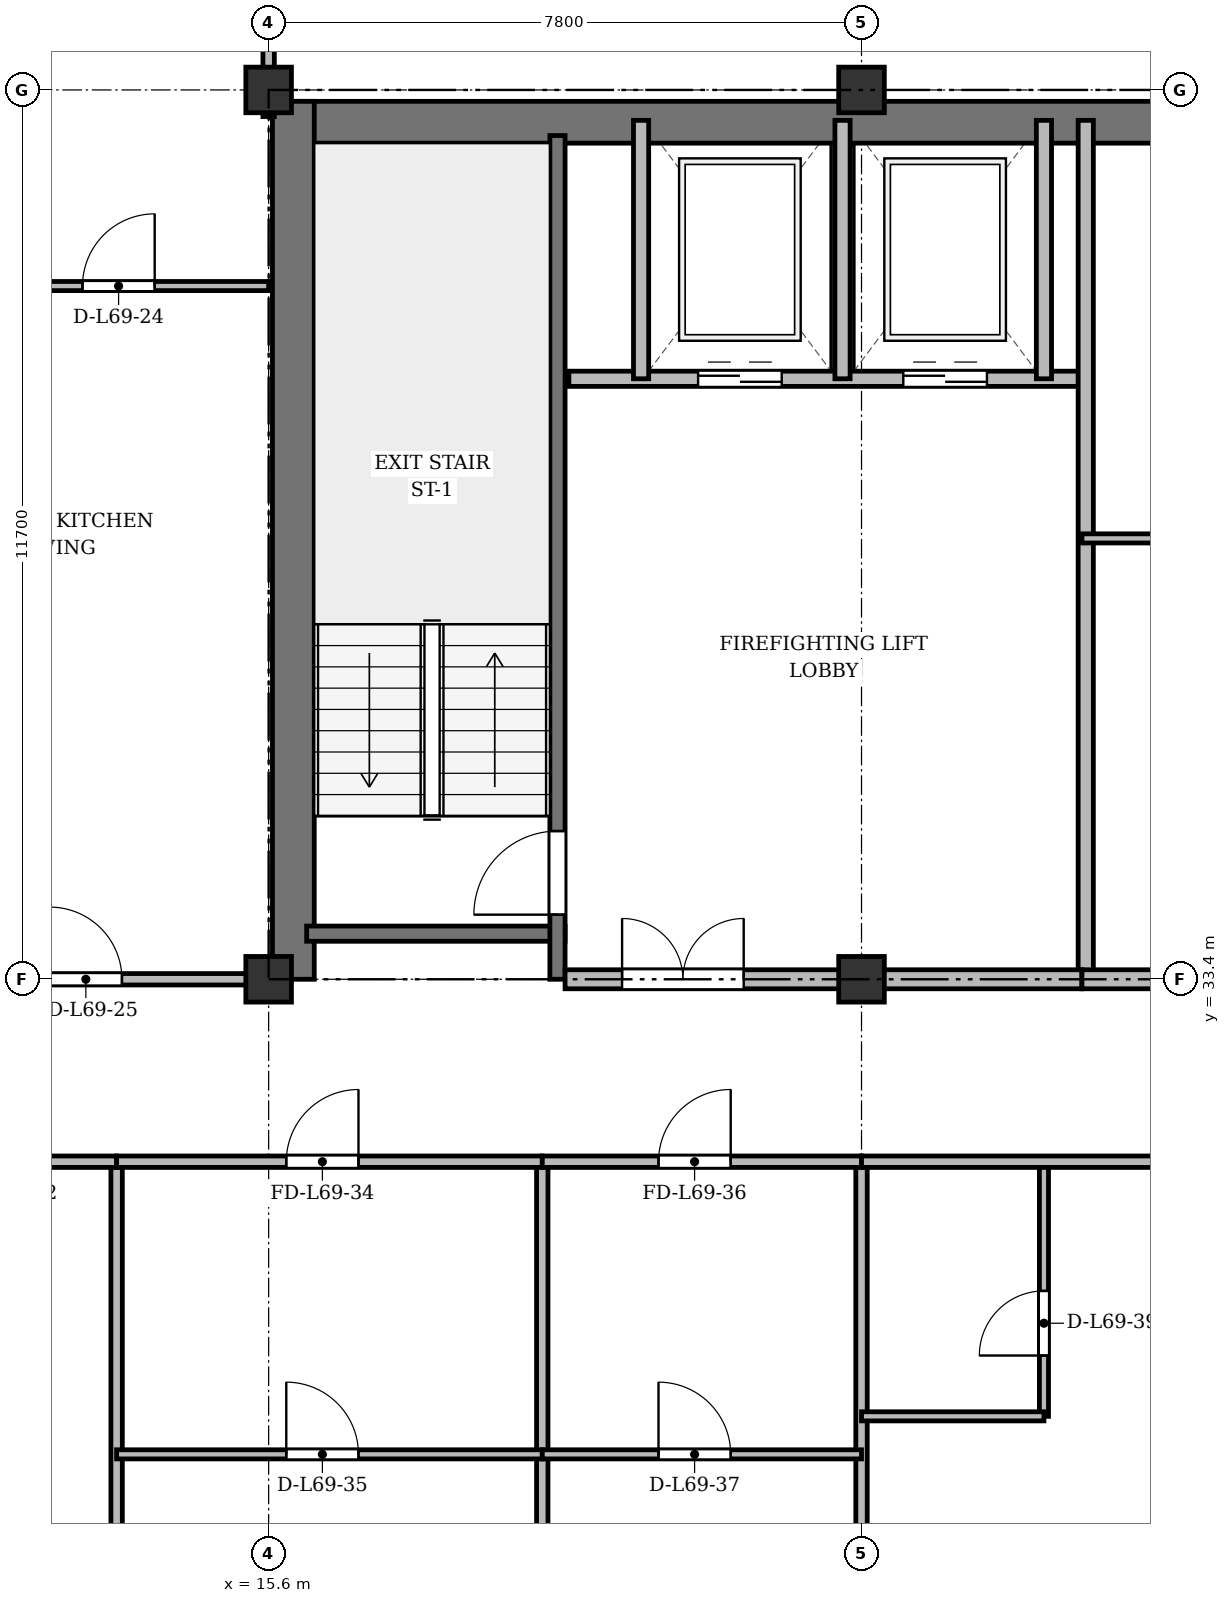
"""IFC4 building model, lengths in metres.
Left out: names, types, materials, properties, quantities, classifications, styles, units other than length and angle.
Written with IfcOpenShell. Run it as: python <this file> out.ifc"""

import sys

from ifc_helpers import new_model, si_unit, direction, frame, frame_2d, origin, origin_2d, place, context, subcontext, project, spatial, rectangle, extrude, source, transform, mapped, element, fill, save


model = new_model("IFC4")
c1 = context("Model", 3, precision=1e-05, world=origin(), true_north=direction((0.0, 1.0)))
c2 = subcontext(c1, "Body", "Model", "MODEL_VIEW")
j1 = project(units=[si_unit("LENGTHUNIT", "METRE"), si_unit("PLANEANGLEUNIT", "RADIAN")], contexts=[c1])
p1 = place(None, origin())
s1 = spatial("IfcSite", under=j1, at=p1, CompositionType="ELEMENT")
p2 = place(p1, origin())
s2 = spatial("IfcBuilding", under=s1, at=p2, CompositionType="ELEMENT")
p3 = place(p2, frame((0.0, 0.0, 266.7)))
s3 = spatial("IfcBuildingStorey", under=s2, at=p3, CompositionType="ELEMENT", Elevation=266.7)
m1 = source(origin(), c2, "Body", "SweptSolid", [
    extrude(rectangle(XDim=0.6, YDim=0.6, at=origin_2d()), origin(), (0.0, 0.0, 1.0), 3.6),
])
for number, where, z_axis, x_axis in (
    (1, (15.6, 33.4, 0.0), (0.0, 0.0, 1.0), (1.0, 0.0, 0.0)),
    (2, (15.6, 45.1, 0.0), (0.0, 0.0, 1.0), (1.0, 0.0, 0.0)),
    (3, (23.4, 33.4, 0.0), (0.0, 0.0, 1.0), (1.0, 0.0, 0.0)),
    (4, (23.4, 45.1, 0.0), (0.0, 0.0, 1.0), (1.0, 0.0, 0.0)),
):
    element("IfcColumn", number, at=place(p3, frame(where, z_axis=z_axis, x_axis=x_axis)), inside=s3, PredefinedType="COLUMN", context=c2, shape_type="MappedRepresentation", body=[
        mapped(m1, transform((0.0, 0.0, 0.0), x_axis=(1.0, 0.0, 0.0), y_axis=(0.0, 1.0, 0.0), z_axis=(0.0, 0.0, 1.0), scale=1.0)),
    ])
p4 = place(p3, frame((15.65, 44.675, 0.0), z_axis=(0.0, 0.0, 1.0), x_axis=(1.0, 0.0, 0.0)))
e5 = element("IfcWall", 5, at=p4, inside=s3, PredefinedType="SHEAR", context=c2, shape_type="SweptSolid", body=[
    extrude(rectangle(XDim=43.1, YDim=0.55, at=frame_2d((21.55, 0.0))), origin(), (0.0, 0.0, 1.0), 3.37),
])
p5 = place(p3, frame((15.925, 33.4, 0.0), z_axis=(0.0, 0.0, 1.0), x_axis=(0.0, 1.0, 0.0)))
e6 = element("IfcWall", 6, at=p5, inside=s3, PredefinedType="SHEAR", context=c2, shape_type="SweptSolid", body=[
    extrude(rectangle(XDim=11.55, YDim=0.55, at=frame_2d((5.775, 0.0))), origin(), (0.0, 0.0, 1.0), 3.37),
])
p6 = place(p3, frame((16.1, 34.0, 0.0), z_axis=(0.0, 0.0, 1.0), x_axis=(1.0, 0.0, 0.0)))
e7 = element("IfcWall", 7, at=p6, inside=s3, PredefinedType="SHEAR", context=c2, shape_type="SweptSolid", body=[
    extrude(rectangle(XDim=3.4, YDim=0.2, at=frame_2d((1.7, 0.0))), origin(), (0.0, 0.0, 1.0), 3.37),
])
p7 = place(p3, frame((19.4, 33.4, 0.0), z_axis=(0.0, 0.0, 1.0), x_axis=(0.0, 1.0, 0.0)))
e8 = element("IfcWall", 8, at=p7, inside=s3, PredefinedType="SHEAR", context=c2, shape_type="SweptSolid", body=[
    extrude(rectangle(XDim=11.1, YDim=0.2, at=frame_2d((5.55, 0.0))), origin(), (0.0, 0.0, 1.0), 3.37),
])
p8 = place(p7, frame((0.85, 0.0, 0.0)))
e9 = element("IfcOpeningElement", 9, at=p8, cuts=e8, PredefinedType="OPENING", context=c2, shape_type="SweptSolid", body=[
    extrude(rectangle(XDim=1.1, YDim=2.15, at=frame_2d((0.55, 1.075))), frame((0.0, 0.11, 0.0), z_axis=(0.0, -1.0, 0.0), x_axis=(1.0, 0.0, 0.0)), (0.0, 0.0, 1.0), 0.22),
])
p9 = place(p3, frame((19.55, 41.3, 0.0), z_axis=(0.0, 0.0, 1.0), x_axis=(1.0, 0.0, 0.0)))
e10 = element("IfcWall", 10, at=p9, inside=s3, PredefinedType="SOLIDWALL", context=c2, shape_type="SweptSolid", body=[
    extrude(rectangle(XDim=6.75, YDim=0.2, at=frame_2d((3.375, 0.0))), origin(), (0.0, 0.0, 1.0), 3.37),
])
p10 = place(p9, frame((1.7, 0.0, 0.0)))
e11 = element("IfcOpeningElement", 11, at=p10, cuts=e10, PredefinedType="OPENING", context=c2, shape_type="SweptSolid", body=[
    extrude(rectangle(XDim=1.1, YDim=2.15, at=frame_2d((0.55, 1.075))), frame((0.0, 0.11, 0.0), z_axis=(0.0, -1.0, 0.0), x_axis=(1.0, 0.0, 0.0)), (0.0, 0.0, 1.0), 0.22),
])
p11 = place(p9, frame((4.4, 0.0, 0.0)))
e12 = element("IfcOpeningElement", 12, at=p11, cuts=e10, PredefinedType="OPENING", context=c2, shape_type="SweptSolid", body=[
    extrude(rectangle(XDim=1.1, YDim=2.15, at=frame_2d((0.55, 1.075))), frame((0.0, 0.11, 0.0), z_axis=(0.0, -1.0, 0.0), x_axis=(1.0, 0.0, 0.0)), (0.0, 0.0, 1.0), 0.22),
])
for number, where, z_axis, x_axis in (
    (13, (20.5, 41.3, 0.0), (0.0, 0.0, 1.0), (0.0, 1.0, 0.0)),
    (14, (23.15, 41.3, 0.0), (0.0, 0.0, 1.0), (0.0, 1.0, 0.0)),
    (15, (25.8, 41.3, 0.0), (0.0, 0.0, 1.0), (0.0, 1.0, 0.0)),
):
    element("IfcWall", number, at=place(p3, frame(where, z_axis=z_axis, x_axis=x_axis)), inside=s3, PredefinedType="SOLIDWALL", context=c2, shape_type="SweptSolid", body=[
        extrude(rectangle(XDim=3.4, YDim=0.2, at=frame_2d((1.7, 0.0))), origin(), (0.0, 0.0, 1.0), 3.37),
    ])
p12 = place(p3, frame((26.35, 33.4, 0.0), z_axis=(0.0, 0.0, 1.0), x_axis=(0.0, 1.0, 0.0)))
e16 = element("IfcWall", 16, at=p12, inside=s3, PredefinedType="SOLIDWALL", context=c2, shape_type="SweptSolid", body=[
    extrude(rectangle(XDim=11.3, YDim=0.2, at=frame_2d((5.65, 0.0))), origin(), (0.0, 0.0, 1.0), 2.92),
])
p13 = place(p3, frame((19.5, 33.4, 0.0), z_axis=(0.0, 0.0, 1.0), x_axis=(1.0, 0.0, 0.0)))
e17 = element("IfcWall", 17, at=p13, inside=s3, PredefinedType="PARTITIONING", context=c2, shape_type="SweptSolid", body=[
    extrude(rectangle(XDim=6.8, YDim=0.25, at=frame_2d((3.4, 0.0))), origin(), (0.0, 0.0, 1.0), 2.92),
])
p14 = place(p13, frame((0.75, 0.0, 0.0)))
e18 = element("IfcOpeningElement", 18, at=p14, cuts=e17, PredefinedType="OPENING", context=c2, shape_type="SweptSolid", body=[
    extrude(rectangle(XDim=1.6, YDim=2.2, at=frame_2d((0.8, 1.1))), frame((0.0, 0.135, 0.0), z_axis=(0.0, -1.0, 0.0), x_axis=(1.0, 0.0, 0.0)), (0.0, 0.0, 1.0), 0.27),
])
p15 = place(p3, frame((26.3, 39.2, 0.0), z_axis=(0.0, 0.0, 1.0), x_axis=(1.0, 0.0, 0.0)))
e19 = element("IfcWall", 19, at=p15, inside=s3, PredefinedType="PARTITIONING", context=c2, shape_type="SweptSolid", body=[
    extrude(rectangle(XDim=7.0, YDim=0.12, at=frame_2d((3.5, 0.0))), origin(), (0.0, 0.0, 1.0), 2.87),
])
p16 = place(p15, frame((2.6, 0.0, 0.0)))
e20 = element("IfcOpeningElement", 20, at=p16, cuts=e19, PredefinedType="OPENING", context=c2, shape_type="SweptSolid", body=[
    extrude(rectangle(XDim=0.95, YDim=2.15, at=frame_2d((0.475, 1.075))), frame((0.0, 0.07, 0.0), z_axis=(0.0, -1.0, 0.0), x_axis=(1.0, 0.0, 0.0)), (0.0, 0.0, 1.0), 0.14),
])
p17 = place(p3, frame((26.3, 33.4, 0.0), z_axis=(0.0, 0.0, 1.0), x_axis=(1.0, 0.0, 0.0)))
e21 = element("IfcWall", 21, at=p17, inside=s3, PredefinedType="PARTITIONING", context=c2, shape_type="SweptSolid", body=[
    extrude(rectangle(XDim=7.0, YDim=0.25, at=frame_2d((3.5, 0.0))), origin(), (0.0, 0.0, 1.0), 2.92),
])
p18 = place(p17, frame((1.35, 0.0, 0.0)))
e22 = element("IfcOpeningElement", 22, at=p18, cuts=e21, PredefinedType="OPENING", context=c2, shape_type="SweptSolid", body=[
    extrude(rectangle(XDim=0.95, YDim=2.15, at=frame_2d((0.475, 1.075))), frame((0.0, 0.135, 0.0), z_axis=(0.0, -1.0, 0.0), x_axis=(1.0, 0.0, 0.0)), (0.0, 0.0, 1.0), 0.27),
])
p19 = place(p3, frame((12.025, 42.52, 0.0), z_axis=(0.0, 0.0, 1.0), x_axis=(1.0, 0.0, 0.0)))
e23 = element("IfcWall", 23, at=p19, inside=s3, PredefinedType="PARTITIONING", context=c2, shape_type="SweptSolid", body=[
    extrude(rectangle(XDim=3.575, YDim=0.12, at=frame_2d((1.788, 0.0))), origin(), (0.0, 0.0, 1.0), 2.87),
])
p20 = place(p19, frame((1.126, 0.0, 0.0)))
e24 = element("IfcOpeningElement", 24, at=p20, cuts=e23, PredefinedType="OPENING", context=c2, shape_type="SweptSolid", body=[
    extrude(rectangle(XDim=0.95, YDim=2.15, at=frame_2d((0.475, 1.075))), frame((0.0, 0.07, 0.0), z_axis=(0.0, -1.0, 0.0), x_axis=(1.0, 0.0, 0.0)), (0.0, 0.0, 1.0), 0.14),
])
p21 = place(p3, frame((8.45, 33.4, 0.0), z_axis=(0.0, 0.0, 1.0), x_axis=(1.0, 0.0, 0.0)))
e25 = element("IfcWall", 25, at=p21, inside=s3, PredefinedType="PARTITIONING", context=c2, shape_type="SweptSolid", body=[
    extrude(rectangle(XDim=7.15, YDim=0.15, at=frame_2d((3.575, 0.0))), origin(), (0.0, 0.0, 1.0), 2.92),
])
p22 = place(p21, frame((4.27, 0.0, 0.0)))
e26 = element("IfcOpeningElement", 26, at=p22, cuts=e25, PredefinedType="OPENING", context=c2, shape_type="SweptSolid", body=[
    extrude(rectangle(XDim=0.95, YDim=2.15, at=frame_2d((0.475, 1.075))), frame((0.0, 0.085, 0.0), z_axis=(0.0, -1.0, 0.0), x_axis=(1.0, 0.0, 0.0)), (0.0, 0.0, 1.0), 0.17),
])
p23 = place(p3, frame((15.6, 44.75, 0.0), z_axis=(0.0, 0.0, 1.0), x_axis=(0.0, 1.0, 0.0)))
e27 = element("IfcWall", 27, at=p23, inside=s3, PredefinedType="PARTITIONING", context=c2, shape_type="SweptSolid", body=[
    extrude(rectangle(XDim=3.61, YDim=0.15, at=frame_2d((1.805, 0.0))), origin(), (0.0, 0.0, 1.0), 2.87),
])
p24 = place(p23, frame((1.1, 0.0, 0.0)))
e28 = element("IfcOpeningElement", 28, at=p24, cuts=e27, PredefinedType="OPENING", context=c2, shape_type="SweptSolid", body=[
    extrude(rectangle(XDim=0.95, YDim=2.15, at=frame_2d((0.475, 1.075))), frame((0.0, 0.085, 0.0), z_axis=(0.0, -1.0, 0.0), x_axis=(1.0, 0.0, 0.0)), (0.0, 0.0, 1.0), 0.17),
])
for number, where, z_axis, x_axis in (
    (29, (13.6, 3.725, 0.0), (0.0, 0.0, 1.0), (0.0, 1.0, 0.0)),
    (30, (19.2, 3.725, 0.0), (0.0, 0.0, 1.0), (0.0, 1.0, 0.0)),
):
    element("IfcWall", number, at=place(p3, frame(where, z_axis=z_axis, x_axis=x_axis)), inside=s3, PredefinedType="PARTITIONING", context=c2, shape_type="SweptSolid", body=[
        extrude(rectangle(XDim=27.275, YDim=0.15, at=frame_2d((13.637, 0.0))), origin(), (0.0, 0.0, 1.0), 2.92),
    ])
p25 = place(p3, frame((23.4, 3.725, 0.0), z_axis=(0.0, 0.0, 1.0), x_axis=(0.0, 1.0, 0.0)))
e31 = element("IfcWall", 31, at=p25, inside=s3, PredefinedType="PARTITIONING", context=c2, shape_type="SweptSolid", body=[
    extrude(rectangle(XDim=27.275, YDim=0.15, at=frame_2d((13.637, 0.0))), origin(), (0.0, 0.0, 1.0), 2.87),
])
p26 = place(p3, frame((8.425, 31.0, 0.0), z_axis=(0.0, 0.0, 1.0), x_axis=(1.0, 0.0, 0.0)))
e32 = element("IfcWall", 32, at=p26, inside=s3, PredefinedType="PARTITIONING", context=c2, shape_type="SweptSolid", body=[
    extrude(rectangle(XDim=5.175, YDim=0.15, at=frame_2d((2.587, 0.0))), origin(), (0.0, 0.0, 1.0), 2.87),
])
p27 = place(p26, frame((3.244, 0.0, 0.0)))
e33 = element("IfcOpeningElement", 33, at=p27, cuts=e32, PredefinedType="OPENING", context=c2, shape_type="SweptSolid", body=[
    extrude(rectangle(XDim=0.95, YDim=2.15, at=frame_2d((0.475, 1.075))), frame((0.0, 0.085, 0.0), z_axis=(0.0, -1.0, 0.0), x_axis=(1.0, 0.0, 0.0)), (0.0, 0.0, 1.0), 0.17),
])
p28 = place(p3, frame((13.6, 31.0, 0.0), z_axis=(0.0, 0.0, 1.0), x_axis=(1.0, 0.0, 0.0)))
e34 = element("IfcWall", 34, at=p28, inside=s3, PredefinedType="PARTITIONING", context=c2, shape_type="SweptSolid", body=[
    extrude(rectangle(XDim=5.6, YDim=0.15, at=frame_2d((2.8, 0.0))), origin(), (0.0, 0.0, 1.0), 2.87),
])
p29 = place(p28, frame((2.232, 0.0, 0.0)))
e35 = element("IfcOpeningElement", 35, at=p29, cuts=e34, PredefinedType="OPENING", context=c2, shape_type="SweptSolid", body=[
    extrude(rectangle(XDim=0.95, YDim=2.15, at=frame_2d((0.475, 1.075))), frame((0.0, 0.085, 0.0), z_axis=(0.0, -1.0, 0.0), x_axis=(1.0, 0.0, 0.0)), (0.0, 0.0, 1.0), 0.17),
])
p30 = place(p3, frame((13.6, 27.15, 0.0), z_axis=(0.0, 0.0, 1.0), x_axis=(1.0, 0.0, 0.0)))
e36 = element("IfcWall", 36, at=p30, inside=s3, PredefinedType="PARTITIONING", context=c2, shape_type="SweptSolid", body=[
    extrude(rectangle(XDim=5.6, YDim=0.12, at=frame_2d((2.8, 0.0))), origin(), (0.0, 0.0, 1.0), 2.87),
])
p31 = place(p30, frame((2.232, 0.0, 0.0)))
e37 = element("IfcOpeningElement", 37, at=p31, cuts=e36, PredefinedType="OPENING", context=c2, shape_type="SweptSolid", body=[
    extrude(rectangle(XDim=0.95, YDim=2.15, at=frame_2d((0.475, 1.075))), frame((0.0, 0.07, 0.0), z_axis=(0.0, -1.0, 0.0), x_axis=(1.0, 0.0, 0.0)), (0.0, 0.0, 1.0), 0.14),
])
p32 = place(p3, frame((19.2, 31.0, 0.0), z_axis=(0.0, 0.0, 1.0), x_axis=(1.0, 0.0, 0.0)))
e38 = element("IfcWall", 38, at=p32, inside=s3, PredefinedType="PARTITIONING", context=c2, shape_type="SweptSolid", body=[
    extrude(rectangle(XDim=4.2, YDim=0.15, at=frame_2d((2.1, 0.0))), origin(), (0.0, 0.0, 1.0), 2.87),
])
p33 = place(p32, frame((1.529, 0.0, 0.0)))
e39 = element("IfcOpeningElement", 39, at=p33, cuts=e38, PredefinedType="OPENING", context=c2, shape_type="SweptSolid", body=[
    extrude(rectangle(XDim=0.95, YDim=2.15, at=frame_2d((0.475, 1.075))), frame((0.0, 0.085, 0.0), z_axis=(0.0, -1.0, 0.0), x_axis=(1.0, 0.0, 0.0)), (0.0, 0.0, 1.0), 0.17),
])
p34 = place(p3, frame((19.2, 27.15, 0.0), z_axis=(0.0, 0.0, 1.0), x_axis=(1.0, 0.0, 0.0)))
e40 = element("IfcWall", 40, at=p34, inside=s3, PredefinedType="PARTITIONING", context=c2, shape_type="SweptSolid", body=[
    extrude(rectangle(XDim=4.2, YDim=0.12, at=frame_2d((2.1, 0.0))), origin(), (0.0, 0.0, 1.0), 2.87),
])
p35 = place(p34, frame((1.529, 0.0, 0.0)))
e41 = element("IfcOpeningElement", 41, at=p35, cuts=e40, PredefinedType="OPENING", context=c2, shape_type="SweptSolid", body=[
    extrude(rectangle(XDim=0.95, YDim=2.15, at=frame_2d((0.475, 1.075))), frame((0.0, 0.07, 0.0), z_axis=(0.0, -1.0, 0.0), x_axis=(1.0, 0.0, 0.0)), (0.0, 0.0, 1.0), 0.14),
])
p36 = place(p3, frame((25.8, 27.65, 0.0), z_axis=(0.0, 0.0, 1.0), x_axis=(0.0, 1.0, 0.0)))
e42 = element("IfcWall", 42, at=p36, inside=s3, PredefinedType="PARTITIONING", context=c2, shape_type="SweptSolid", body=[
    extrude(rectangle(XDim=3.35, YDim=0.12, at=frame_2d((1.675, 0.0))), origin(), (0.0, 0.0, 1.0), 3.37),
])
p37 = place(p36, frame((0.8, 0.0, 0.0)))
e43 = element("IfcOpeningElement", 43, at=p37, cuts=e42, PredefinedType="OPENING", context=c2, shape_type="SweptSolid", body=[
    extrude(rectangle(XDim=0.85, YDim=2.1, at=frame_2d((0.425, 1.05))), frame((0.0, 0.07, 0.0), z_axis=(0.0, -1.0, 0.0), x_axis=(1.0, 0.0, 0.0)), (0.0, 0.0, 1.0), 0.14),
])
p38 = place(p3, frame((23.4, 27.65, 0.0), z_axis=(0.0, 0.0, 1.0), x_axis=(1.0, 0.0, 0.0)))
e44 = element("IfcWall", 44, at=p38, inside=s3, PredefinedType="PARTITIONING", context=c2, shape_type="SweptSolid", body=[
    extrude(rectangle(XDim=2.4, YDim=0.12, at=frame_2d((1.2, 0.0))), origin(), (0.0, 0.0, 1.0), 2.87),
])
p39 = place(p3, frame((23.4, 31.0, 0.0), z_axis=(0.0, 0.0, 1.0), x_axis=(1.0, 0.0, 0.0)))
e45 = element("IfcWall", 45, at=p39, inside=s3, PredefinedType="PARTITIONING", context=c2, shape_type="SweptSolid", body=[
    extrude(rectangle(XDim=7.2, YDim=0.15, at=frame_2d((3.6, 0.0))), origin(), (0.0, 0.0, 1.0), 2.87),
])
p40 = place(p39, frame((4.706, 0.0, 0.0)))
e46 = element("IfcOpeningElement", 46, at=p40, cuts=e45, PredefinedType="OPENING", context=c2, shape_type="SweptSolid", body=[
    extrude(rectangle(XDim=0.95, YDim=2.15, at=frame_2d((0.475, 1.075))), frame((0.0, 0.085, 0.0), z_axis=(0.0, -1.0, 0.0), x_axis=(1.0, 0.0, 0.0)), (0.0, 0.0, 1.0), 0.17),
])
m2 = source(origin(), c2, "Body", "SweptSolid", [
    extrude(rectangle(XDim=1.1, YDim=2.15, at=frame_2d((0.55, 1.075))), frame((0.0, 0.025, 0.0), z_axis=(0.0, -1.0, 0.0), x_axis=(1.0, 0.0, 0.0)), (0.0, 0.0, 1.0), 0.05),
])
p41 = place(p8, origin())
e47 = element("IfcDoor", 47, at=p41, inside=s3, OperationType="SINGLE_SWING_LEFT", PredefinedType="DOOR", context=c2, shape_type="MappedRepresentation", body=[
    mapped(m2, transform((0.0, 0.0, 0.0), x_axis=(1.0, 0.0, 0.0), y_axis=(0.0, 1.0, 0.0), z_axis=(0.0, 0.0, 1.0), scale=1.0)),
])
fill(e9, e47)
p42 = place(p10, origin())
e48 = element("IfcDoor", 48, at=p42, inside=s3, OperationType="DOUBLE_DOOR_SLIDING", PredefinedType="DOOR", context=c2, shape_type="MappedRepresentation", body=[
    mapped(m2, transform((0.0, 0.0, 0.0), x_axis=(1.0, 0.0, 0.0), y_axis=(0.0, 1.0, 0.0), z_axis=(0.0, 0.0, 1.0), scale=1.0)),
])
fill(e11, e48)
p43 = place(p11, origin())
e49 = element("IfcDoor", 49, at=p43, inside=s3, OperationType="DOUBLE_DOOR_SLIDING", PredefinedType="DOOR", context=c2, shape_type="MappedRepresentation", body=[
    mapped(m2, transform((0.0, 0.0, 0.0), x_axis=(1.0, 0.0, 0.0), y_axis=(0.0, 1.0, 0.0), z_axis=(0.0, 0.0, 1.0), scale=1.0)),
])
fill(e12, e49)
m3 = source(origin(), c2, "Body", "SweptSolid", [
    extrude(rectangle(XDim=1.6, YDim=2.2, at=frame_2d((0.8, 1.1))), frame((0.0, 0.025, 0.0), z_axis=(0.0, -1.0, 0.0), x_axis=(1.0, 0.0, 0.0)), (0.0, 0.0, 1.0), 0.05),
])
p44 = place(p14, origin())
e50 = element("IfcDoor", 50, at=p44, inside=s3, OperationType="DOUBLE_DOOR_SINGLE_SWING", PredefinedType="DOOR", context=c2, shape_type="MappedRepresentation", body=[
    mapped(m3, transform((0.0, 0.0, 0.0), x_axis=(1.0, 0.0, 0.0), y_axis=(0.0, 1.0, 0.0), z_axis=(0.0, 0.0, 1.0), scale=1.0)),
])
fill(e18, e50)
m4 = source(origin(), c2, "Body", "SweptSolid", [
    extrude(rectangle(XDim=0.95, YDim=2.15, at=frame_2d((0.475, 1.075))), frame((0.0, 0.025, 0.0), z_axis=(0.0, -1.0, 0.0), x_axis=(1.0, 0.0, 0.0)), (0.0, 0.0, 1.0), 0.05),
])
p45 = place(p20, origin())
e51 = element("IfcDoor", 51, at=p45, inside=s3, OperationType="SINGLE_SWING_RIGHT", PredefinedType="DOOR", context=c2, shape_type="MappedRepresentation", body=[
    mapped(m4, transform((0.0, 0.0, 0.0), x_axis=(1.0, 0.0, 0.0), y_axis=(0.0, 1.0, 0.0), z_axis=(0.0, 0.0, 1.0), scale=1.0)),
])
fill(e24, e51)
p46 = place(p22, origin())
e52 = element("IfcDoor", 52, at=p46, inside=s3, OperationType="SINGLE_SWING_LEFT", PredefinedType="DOOR", context=c2, shape_type="MappedRepresentation", body=[
    mapped(m4, transform((0.0, 0.0, 0.0), x_axis=(1.0, 0.0, 0.0), y_axis=(0.0, 1.0, 0.0), z_axis=(0.0, 0.0, 1.0), scale=1.0)),
])
fill(e26, e52)
p47 = place(p29, origin())
e53 = element("IfcDoor", 53, at=p47, inside=s3, OperationType="SINGLE_SWING_RIGHT", PredefinedType="DOOR", context=c2, shape_type="MappedRepresentation", body=[
    mapped(m4, transform((0.0, 0.0, 0.0), x_axis=(1.0, 0.0, 0.0), y_axis=(0.0, 1.0, 0.0), z_axis=(0.0, 0.0, 1.0), scale=1.0)),
])
fill(e35, e53)
p48 = place(p31, origin())
e54 = element("IfcDoor", 54, at=p48, inside=s3, OperationType="SINGLE_SWING_LEFT", PredefinedType="DOOR", context=c2, shape_type="MappedRepresentation", body=[
    mapped(m4, transform((0.0, 0.0, 0.0), x_axis=(1.0, 0.0, 0.0), y_axis=(0.0, 1.0, 0.0), z_axis=(0.0, 0.0, 1.0), scale=1.0)),
])
fill(e37, e54)
p49 = place(p33, origin())
e55 = element("IfcDoor", 55, at=p49, inside=s3, OperationType="SINGLE_SWING_RIGHT", PredefinedType="DOOR", context=c2, shape_type="MappedRepresentation", body=[
    mapped(m4, transform((0.0, 0.0, 0.0), x_axis=(1.0, 0.0, 0.0), y_axis=(0.0, 1.0, 0.0), z_axis=(0.0, 0.0, 1.0), scale=1.0)),
])
fill(e39, e55)
p50 = place(p35, origin())
e56 = element("IfcDoor", 56, at=p50, inside=s3, OperationType="SINGLE_SWING_LEFT", PredefinedType="DOOR", context=c2, shape_type="MappedRepresentation", body=[
    mapped(m4, transform((0.0, 0.0, 0.0), x_axis=(1.0, 0.0, 0.0), y_axis=(0.0, 1.0, 0.0), z_axis=(0.0, 0.0, 1.0), scale=1.0)),
])
fill(e41, e56)
m5 = source(origin(), c2, "Body", "SweptSolid", [
    extrude(rectangle(XDim=0.85, YDim=2.1, at=frame_2d((0.425, 1.05))), frame((0.0, 0.025, 0.0), z_axis=(0.0, -1.0, 0.0), x_axis=(1.0, 0.0, 0.0)), (0.0, 0.0, 1.0), 0.05),
])
p51 = place(p37, origin())
e57 = element("IfcDoor", 57, at=p51, inside=s3, OperationType="SINGLE_SWING_LEFT", PredefinedType="DOOR", context=c2, shape_type="MappedRepresentation", body=[
    mapped(m5, transform((0.0, 0.0, 0.0), x_axis=(1.0, 0.0, 0.0), y_axis=(0.0, 1.0, 0.0), z_axis=(0.0, 0.0, 1.0), scale=1.0)),
])
fill(e43, e57)
save(model, sys.argv[1])
